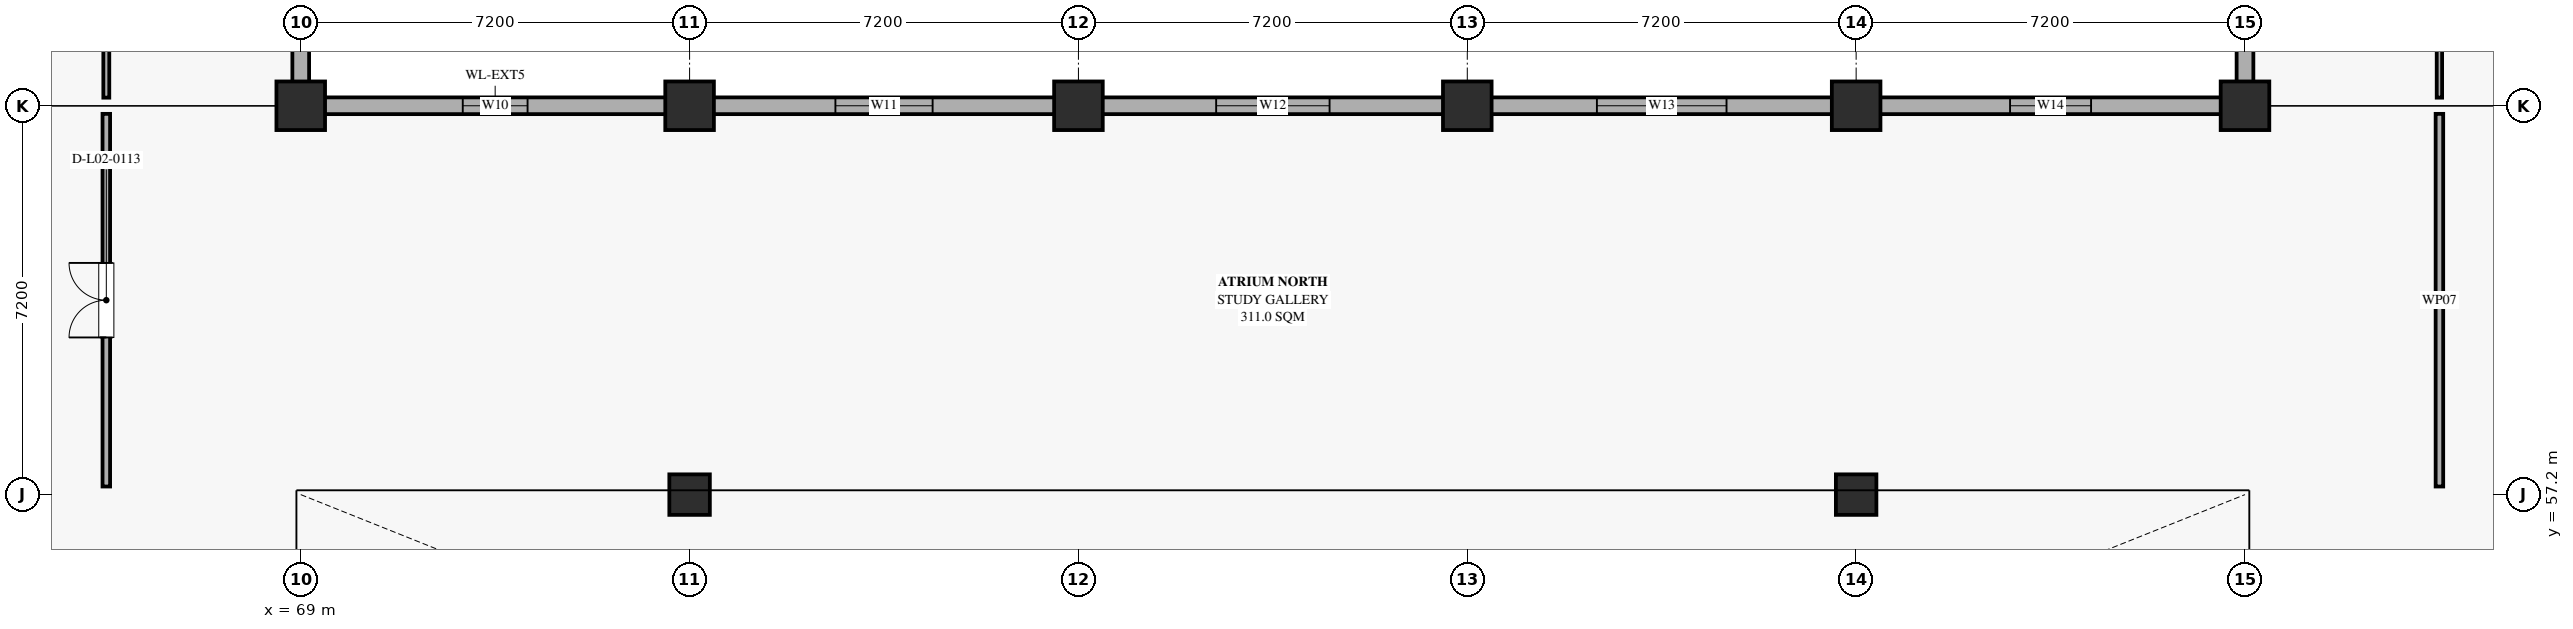
"""IFC4 building model, lengths in metres.
Left out: names, types, materials, properties, quantities, classifications, styles, units other than length and angle.
Written with IfcOpenShell. Run it as: python <this file> out.ifc"""

import sys

from ifc_helpers import new_model, si_unit, direction, frame, frame_2d, origin, origin_2d, place, context, subcontext, project, spatial, rectangle, circle, extrude, element, fill, save


model = new_model("IFC4")
c1 = context("Model", 3, precision=1e-05, world=origin(), true_north=direction((0.0, 1.0)))
c2 = subcontext(c1, "Body", "Model", "MODEL_VIEW")
j1 = project(units=[si_unit("LENGTHUNIT", "METRE"), si_unit("PLANEANGLEUNIT", "RADIAN")], contexts=[c1])
p1 = place(None, origin())
s1 = spatial("IfcSite", under=j1, at=p1, CompositionType="ELEMENT")
p2 = place(p1, origin())
s2 = spatial("IfcBuilding", under=s1, at=p2, CompositionType="ELEMENT")
p3 = place(p2, frame((0.0, 0.0, 10.44)))
s3 = spatial("IfcBuildingStorey", under=s2, at=p3, CompositionType="ELEMENT", Elevation=10.44)
for number, where, z_axis, x_axis in (
    (1, (69.0, 64.4, 0.0), (0.0, 0.0, 1.0), (1.0, 0.0, 0.0)),
    (2, (76.2, 64.4, 0.0), (0.0, 0.0, 1.0), (1.0, 0.0, 0.0)),
    (3, (83.4, 64.4, 0.0), (0.0, 0.0, 1.0), (1.0, 0.0, 0.0)),
    (4, (90.6, 64.4, 0.0), (0.0, 0.0, 1.0), (1.0, 0.0, 0.0)),
    (5, (97.8, 64.4, 0.0), (0.0, 0.0, 1.0), (1.0, 0.0, 0.0)),
    (6, (105.0, 64.4, 0.0), (0.0, 0.0, 1.0), (1.0, 0.0, 0.0)),
):
    element("IfcColumn", number, at=place(p3, frame(where, z_axis=z_axis, x_axis=x_axis)), inside=s3, PredefinedType="COLUMN", context=c2, shape_type="SweptSolid", body=[
        extrude(circle(Radius=0.45, at=origin_2d()), origin(), (0.0, 0.0, 1.0), 4.68),
    ])
for number, where, z_axis, x_axis in (
    (7, (76.2, 57.2, 0.0), (0.0, 0.0, 1.0), (1.0, 0.0, 0.0)),
    (8, (97.8, 57.2, 0.0), (0.0, 0.0, 1.0), (1.0, 0.0, 0.0)),
):
    element("IfcColumn", number, at=place(p3, frame(where, z_axis=z_axis, x_axis=x_axis)), inside=s3, PredefinedType="COLUMN", context=c2, shape_type="SweptSolid", body=[
        extrude(circle(Radius=0.375, at=origin_2d()), origin(), (0.0, 0.0, 1.0), 4.68),
    ])
p4 = place(p3, frame((69.435, 64.4, 0.0), z_axis=(0.0, 0.0, 1.0), x_axis=(1.0, 0.0, 0.0)))
e9 = element("IfcWall", 9, at=p4, inside=s3, PredefinedType="SOLIDWALL", context=c2, shape_type="SweptSolid", body=[
    extrude(rectangle(XDim=6.33, YDim=0.31, at=frame_2d((3.165, 0.0))), origin(), (0.0, 0.0, 1.0), 3.18),
])
p5 = place(p4, frame((2.565, 0.0, 0.85)))
e10 = element("IfcOpeningElement", 10, at=p5, cuts=e9, PredefinedType="OPENING", context=c2, shape_type="SweptSolid", body=[
    extrude(rectangle(XDim=1.2, YDim=2.1, at=frame_2d((0.6, 1.05))), frame((0.0, 0.165, 0.0), z_axis=(0.0, -1.0, 0.0), x_axis=(1.0, 0.0, 0.0)), (0.0, 0.0, 1.0), 0.33),
])
p6 = place(p3, frame((76.635, 64.4, 0.0), z_axis=(0.0, 0.0, 1.0), x_axis=(1.0, 0.0, 0.0)))
e11 = element("IfcWall", 11, at=p6, inside=s3, PredefinedType="SOLIDWALL", context=c2, shape_type="SweptSolid", body=[
    extrude(rectangle(XDim=6.33, YDim=0.31, at=frame_2d((3.165, 0.0))), origin(), (0.0, 0.0, 1.0), 3.18),
])
p7 = place(p6, frame((2.265, 0.0, 0.85)))
e12 = element("IfcOpeningElement", 12, at=p7, cuts=e11, PredefinedType="OPENING", context=c2, shape_type="SweptSolid", body=[
    extrude(rectangle(XDim=1.8, YDim=1.8, at=frame_2d((0.9, 0.9))), frame((0.0, 0.165, 0.0), z_axis=(0.0, -1.0, 0.0), x_axis=(1.0, 0.0, 0.0)), (0.0, 0.0, 1.0), 0.33),
])
p8 = place(p3, frame((83.835, 64.4, 0.0), z_axis=(0.0, 0.0, 1.0), x_axis=(1.0, 0.0, 0.0)))
e13 = element("IfcWall", 13, at=p8, inside=s3, PredefinedType="SOLIDWALL", context=c2, shape_type="SweptSolid", body=[
    extrude(rectangle(XDim=6.33, YDim=0.31, at=frame_2d((3.165, 0.0))), origin(), (0.0, 0.0, 1.0), 3.18),
])
p9 = place(p8, frame((2.115, 0.0, 0.85)))
e14 = element("IfcOpeningElement", 14, at=p9, cuts=e13, PredefinedType="OPENING", context=c2, shape_type="SweptSolid", body=[
    extrude(rectangle(XDim=2.1, YDim=1.8, at=frame_2d((1.05, 0.9))), frame((0.0, 0.165, 0.0), z_axis=(0.0, -1.0, 0.0), x_axis=(1.0, 0.0, 0.0)), (0.0, 0.0, 1.0), 0.33),
])
p10 = place(p3, frame((91.035, 64.4, 0.0), z_axis=(0.0, 0.0, 1.0), x_axis=(1.0, 0.0, 0.0)))
e15 = element("IfcWall", 15, at=p10, inside=s3, PredefinedType="SOLIDWALL", context=c2, shape_type="SweptSolid", body=[
    extrude(rectangle(XDim=6.33, YDim=0.31, at=frame_2d((3.165, 0.0))), origin(), (0.0, 0.0, 1.0), 3.18),
])
p11 = place(p10, frame((1.965, 0.0, 0.85)))
e16 = element("IfcOpeningElement", 16, at=p11, cuts=e15, PredefinedType="OPENING", context=c2, shape_type="SweptSolid", body=[
    extrude(rectangle(XDim=2.4, YDim=1.8, at=frame_2d((1.2, 0.9))), frame((0.0, 0.165, 0.0), z_axis=(0.0, -1.0, 0.0), x_axis=(1.0, 0.0, 0.0)), (0.0, 0.0, 1.0), 0.33),
])
p12 = place(p3, frame((98.235, 64.4, 0.0), z_axis=(0.0, 0.0, 1.0), x_axis=(1.0, 0.0, 0.0)))
e17 = element("IfcWall", 17, at=p12, inside=s3, PredefinedType="SOLIDWALL", context=c2, shape_type="SweptSolid", body=[
    extrude(rectangle(XDim=6.33, YDim=0.31, at=frame_2d((3.165, 0.0))), origin(), (0.0, 0.0, 1.0), 3.18),
])
p13 = place(p12, frame((2.415, 0.0, 0.85)))
e18 = element("IfcOpeningElement", 18, at=p13, cuts=e17, PredefinedType="OPENING", context=c2, shape_type="SweptSolid", body=[
    extrude(rectangle(XDim=1.5, YDim=1.8, at=frame_2d((0.75, 0.9))), frame((0.0, 0.165, 0.0), z_axis=(0.0, -1.0, 0.0), x_axis=(1.0, 0.0, 0.0)), (0.0, 0.0, 1.0), 0.33),
])
p14 = place(p3, frame((69.0, 71.19, 0.0), z_axis=(0.0, 0.0, 1.0), x_axis=(0.0, -1.0, 0.0)))
e19 = element("IfcWall", 19, at=p14, inside=s3, PredefinedType="SOLIDWALL", context=c2, shape_type="SweptSolid", body=[
    extrude(rectangle(XDim=6.355, YDim=0.31, at=frame_2d((3.177, 0.0))), origin(), (0.0, 0.0, 1.0), 3.18),
])
p15 = place(p14, frame((2.327, 0.0, 0.85)))
e20 = element("IfcOpeningElement", 20, at=p15, cuts=e19, PredefinedType="OPENING", context=c2, shape_type="SweptSolid", body=[
    extrude(rectangle(XDim=1.7, YDim=2.0, at=frame_2d((0.85, 1.0))), frame((0.0, 0.165, 0.0), z_axis=(0.0, -1.0, 0.0), x_axis=(1.0, 0.0, 0.0)), (0.0, 0.0, 1.0), 0.33),
])
p16 = place(p3, frame((105.0, 64.835, 0.0), z_axis=(0.0, 0.0, 1.0), x_axis=(0.0, 1.0, 0.0)))
e21 = element("IfcWall", 21, at=p16, inside=s3, PredefinedType="SOLIDWALL", context=c2, shape_type="SweptSolid", body=[
    extrude(rectangle(XDim=6.355, YDim=0.31, at=frame_2d((3.177, 0.0))), origin(), (0.0, 0.0, 1.0), 3.18),
])
p17 = place(p16, frame((2.228, 0.0, 0.85)))
e22 = element("IfcOpeningElement", 22, at=p17, cuts=e21, PredefinedType="OPENING", context=c2, shape_type="SweptSolid", body=[
    extrude(rectangle(XDim=1.9, YDim=2.0, at=frame_2d((0.95, 1.0))), frame((0.0, 0.165, 0.0), z_axis=(0.0, -1.0, 0.0), x_axis=(1.0, 0.0, 0.0)), (0.0, 0.0, 1.0), 0.33),
])
p18 = place(p3, frame((65.4, 57.35, 0.0), z_axis=(0.0, 0.0, 1.0), x_axis=(0.0, 1.0, 0.0)))
e23 = element("IfcWall", 23, at=p18, inside=s3, PredefinedType="PARTITIONING", context=c2, shape_type="SweptSolid", body=[
    extrude(rectangle(XDim=6.9, YDim=0.14, at=frame_2d((3.45, 0.0))), origin(), (0.0, 0.0, 1.0), 3.16),
])
p19 = place(p18, frame((2.76, 0.0, 0.0)))
e24 = element("IfcOpeningElement", 24, at=p19, cuts=e23, PredefinedType="OPENING", context=c2, shape_type="SweptSolid", body=[
    extrude(rectangle(XDim=1.38, YDim=2.05, at=frame_2d((0.69, 1.025))), frame((0.0, 0.08, 0.0), z_axis=(0.0, -1.0, 0.0), x_axis=(1.0, 0.0, 0.0)), (0.0, 0.0, 1.0), 0.16),
])
p20 = place(p3, frame((108.6, 64.25, 0.0), z_axis=(0.0, 0.0, 1.0), x_axis=(0.0, -1.0, 0.0)))
e25 = element("IfcWall", 25, at=p20, inside=s3, PredefinedType="PARTITIONING", context=c2, shape_type="SweptSolid", body=[
    extrude(rectangle(XDim=6.9, YDim=0.14, at=frame_2d((3.45, 0.0))), origin(), (0.0, 0.0, 1.0), 3.16),
])
p21 = place(p3, frame((65.4, 64.55, 0.0), z_axis=(0.0, 0.0, 1.0), x_axis=(0.0, 1.0, 0.0)))
e26 = element("IfcWall", 26, at=p21, inside=s3, PredefinedType="PARTITIONING", context=c2, shape_type="SweptSolid", body=[
    extrude(rectangle(XDim=21.3, YDim=0.11, at=frame_2d((10.65, 0.0))), origin(), (0.0, 0.0, 1.0), 3.16),
])
p22 = place(p21, frame((9.96, 0.0, 0.0)))
e27 = element("IfcOpeningElement", 27, at=p22, cuts=e26, PredefinedType="OPENING", context=c2, shape_type="SweptSolid", body=[
    extrude(rectangle(XDim=1.38, YDim=2.1, at=frame_2d((0.69, 1.05))), frame((0.0, 0.065, 0.0), z_axis=(0.0, -1.0, 0.0), x_axis=(1.0, 0.0, 0.0)), (0.0, 0.0, 1.0), 0.13),
])
p23 = place(p3, frame((108.6, 85.85, 0.0), z_axis=(0.0, 0.0, 1.0), x_axis=(0.0, -1.0, 0.0)))
e28 = element("IfcWall", 28, at=p23, inside=s3, PredefinedType="PARTITIONING", context=c2, shape_type="SweptSolid", body=[
    extrude(rectangle(XDim=21.3, YDim=0.1, at=frame_2d((10.65, 0.0))), origin(), (0.0, 0.0, 1.0), 3.16),
])
p24 = place(p23, frame((9.96, 0.0, 0.0)))
e29 = element("IfcOpeningElement", 29, at=p24, cuts=e28, PredefinedType="OPENING", context=c2, shape_type="SweptSolid", body=[
    extrude(rectangle(XDim=1.38, YDim=2.16, at=frame_2d((0.69, 1.08))), frame((0.0, 0.06, 0.0), z_axis=(0.0, -1.0, 0.0), x_axis=(1.0, 0.0, 0.0)), (0.0, 0.0, 1.0), 0.12),
])
p25 = place(p5, origin())
e30 = element("IfcWindow", 30, at=p25, inside=s3, PartitioningType="SINGLE_PANEL", PredefinedType="WINDOW", context=c2, shape_type="SweptSolid", body=[
    extrude(rectangle(XDim=1.2, YDim=2.1, at=frame_2d((0.6, 1.05))), frame((0.0, 0.03, 0.0), z_axis=(0.0, -1.0, 0.0), x_axis=(1.0, 0.0, 0.0)), (0.0, 0.0, 1.0), 0.06),
])
fill(e10, e30)
p26 = place(p7, origin())
e31 = element("IfcWindow", 31, at=p26, inside=s3, PartitioningType="DOUBLE_PANEL_VERTICAL", PredefinedType="WINDOW", context=c2, shape_type="SweptSolid", body=[
    extrude(rectangle(XDim=1.8, YDim=1.8, at=frame_2d((0.9, 0.9))), frame((0.0, 0.03, 0.0), z_axis=(0.0, -1.0, 0.0), x_axis=(1.0, 0.0, 0.0)), (0.0, 0.0, 1.0), 0.06),
])
fill(e12, e31)
p27 = place(p9, origin())
e32 = element("IfcWindow", 32, at=p27, inside=s3, PartitioningType="DOUBLE_PANEL_VERTICAL", PredefinedType="WINDOW", context=c2, shape_type="SweptSolid", body=[
    extrude(rectangle(XDim=2.1, YDim=1.8, at=frame_2d((1.05, 0.9))), frame((0.0, 0.03, 0.0), z_axis=(0.0, -1.0, 0.0), x_axis=(1.0, 0.0, 0.0)), (0.0, 0.0, 1.0), 0.06),
])
fill(e14, e32)
p28 = place(p11, origin())
e33 = element("IfcWindow", 33, at=p28, inside=s3, PartitioningType="DOUBLE_PANEL_VERTICAL", PredefinedType="WINDOW", context=c2, shape_type="SweptSolid", body=[
    extrude(rectangle(XDim=2.4, YDim=1.8, at=frame_2d((1.2, 0.9))), frame((0.0, 0.03, 0.0), z_axis=(0.0, -1.0, 0.0), x_axis=(1.0, 0.0, 0.0)), (0.0, 0.0, 1.0), 0.06),
])
fill(e16, e33)
p29 = place(p13, origin())
e34 = element("IfcWindow", 34, at=p29, inside=s3, PartitioningType="SINGLE_PANEL", PredefinedType="WINDOW", context=c2, shape_type="SweptSolid", body=[
    extrude(rectangle(XDim=1.5, YDim=1.8, at=frame_2d((0.75, 0.9))), frame((0.0, 0.03, 0.0), z_axis=(0.0, -1.0, 0.0), x_axis=(1.0, 0.0, 0.0)), (0.0, 0.0, 1.0), 0.06),
])
fill(e18, e34)
p30 = place(p19, origin())
e35 = element("IfcDoor", 35, at=p30, inside=s3, OperationType="DOUBLE_DOOR_SINGLE_SWING", PredefinedType="DOOR", context=c2, shape_type="SweptSolid", body=[
    extrude(rectangle(XDim=1.38, YDim=2.05, at=frame_2d((0.69, 1.025))), frame((0.0, 0.025, 0.0), z_axis=(0.0, -1.0, 0.0), x_axis=(1.0, 0.0, 0.0)), (0.0, 0.0, 1.0), 0.05),
])
fill(e24, e35)
save(model, sys.argv[1])
